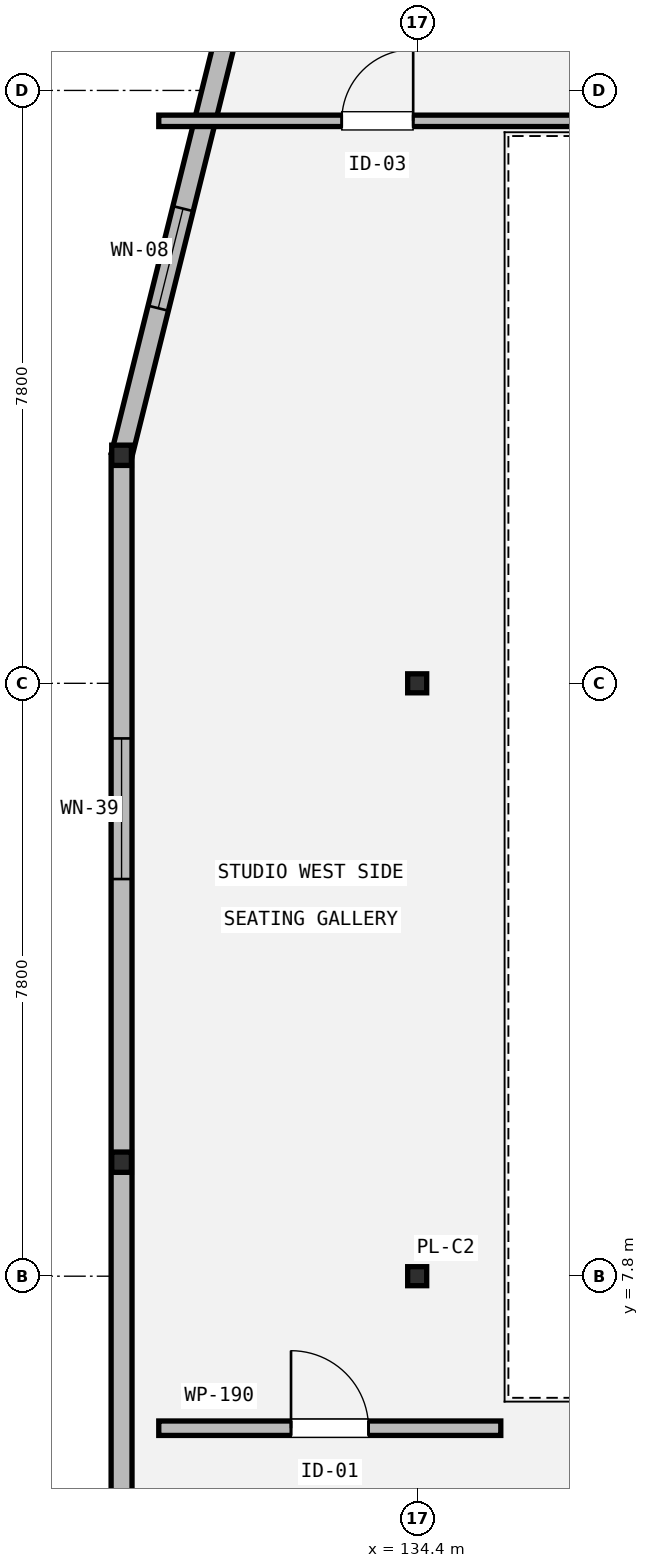
"""IFC4 building model, lengths in metres.
Left out: names, types, materials, properties, quantities, classifications, styles, units other than length and angle.
Written with IfcOpenShell. Run it as: python <this file> out.ifc"""

import sys

from ifc_helpers import new_model, si_unit, direction, frame, frame_2d, origin, origin_2d, place, context, subcontext, project, spatial, rectangle, hollow_rectangle, i_section, extrude, element, fill, save


model = new_model("IFC4")
c1 = context("Model", 3, precision=1e-05, world=origin(), true_north=direction((0.0, 1.0)))
c2 = subcontext(c1, "Body", "Model", "MODEL_VIEW")
j1 = project(units=[si_unit("LENGTHUNIT", "METRE"), si_unit("PLANEANGLEUNIT", "RADIAN")], contexts=[c1])
p1 = place(None, origin())
s1 = spatial("IfcSite", under=j1, at=p1, CompositionType="ELEMENT")
p2 = place(p1, origin())
s2 = spatial("IfcBuilding", under=s1, at=p2, CompositionType="ELEMENT")
p3 = place(p2, frame((0.0, 0.0, 5.4)))
s3 = spatial("IfcBuildingStorey", under=s2, at=p3, CompositionType="ELEMENT", Elevation=5.4)
for number, where, z_axis, x_axis in (
    (1, (130.51, 9.3, 0.0), (0.0, 0.0, 1.0), (1.0, 0.0, 0.0)),
    (2, (130.51, 18.6, 0.0), (0.0, 0.0, 1.0), (1.0, 0.0, 0.0)),
):
    element("IfcColumn", number, at=place(p3, frame(where, z_axis=z_axis, x_axis=x_axis)), inside=s3, PredefinedType="COLUMN", context=c2, shape_type="SweptSolid", body=[
        extrude(i_section(OverallWidth=0.259, OverallDepth=0.267, WebThickness=0.013, FlangeThickness=0.021, FilletRadius=0.013, at=origin_2d()), origin(), (0.0, 0.0, 1.0), 4.8),
    ])
for number, where, z_axis, x_axis in (
    (3, (134.4, 7.8, 0.0), (0.0, 0.0, 1.0), (1.0, 0.0, 0.0)),
    (4, (134.4, 15.6, 0.0), (0.0, 0.0, 1.0), (1.0, 0.0, 0.0)),
):
    element("IfcColumn", number, at=place(p3, frame(where, z_axis=z_axis, x_axis=x_axis)), inside=s3, PredefinedType="PILASTER", context=c2, shape_type="SweptSolid", body=[
        extrude(hollow_rectangle(XDim=0.25, YDim=0.25, WallThickness=0.012, at=origin_2d()), origin(), (0.0, 0.0, 1.0), 4.8),
    ])
p4 = place(p3, frame((130.51, 0.0, 0.0), z_axis=(0.0, 0.0, 1.0), x_axis=(0.0, 1.0, 0.0)))
e5 = element("IfcWall", 5, at=p4, inside=s3, PredefinedType="STANDARD", context=c2, shape_type="SweptSolid", body=[
    extrude(rectangle(XDim=18.6, YDim=0.275, at=frame_2d((9.3, 0.0))), origin(), (0.0, 0.0, 1.0), 3.889),
])
p5 = place(p4, frame((2.95, 0.0, 0.9)))
e6 = element("IfcOpeningElement", 6, at=p5, cuts=e5, PredefinedType="OPENING", context=c2, shape_type="SweptSolid", body=[
    extrude(rectangle(XDim=1.6, YDim=2.2, at=frame_2d((0.8, 1.1))), frame((0.0, 0.147, 0.0), z_axis=(0.0, -1.0, 0.0), x_axis=(1.0, 0.0, 0.0)), (0.0, 0.0, 1.0), 0.295),
])
p6 = place(p4, frame((13.025, 0.0, 0.9)))
e7 = element("IfcOpeningElement", 7, at=p6, cuts=e5, PredefinedType="OPENING", context=c2, shape_type="SweptSolid", body=[
    extrude(rectangle(XDim=1.85, YDim=2.2, at=frame_2d((0.925, 1.1))), frame((0.0, 0.147, 0.0), z_axis=(0.0, -1.0, 0.0), x_axis=(1.0, 0.0, 0.0)), (0.0, 0.0, 1.0), 0.295),
])
p7 = place(p3, frame((130.51, 18.6, 0.0), z_axis=(0.0, 0.0, 1.0), x_axis=(0.241917443673, 0.970296836255, 0.0)))
e8 = element("IfcWall", 8, at=p7, inside=s3, PredefinedType="STANDARD", context=c2, shape_type="SweptSolid", body=[
    extrude(rectangle(XDim=16.077, YDim=0.275, at=frame_2d((8.039, 0.0))), origin(), (0.0, 0.0, 1.0), 3.955),
])
p8 = place(p7, frame((1.994, 0.0, 0.9)))
e9 = element("IfcOpeningElement", 9, at=p8, cuts=e8, PredefinedType="OPENING", context=c2, shape_type="SweptSolid", body=[
    extrude(rectangle(XDim=1.35, YDim=1.8, at=frame_2d((0.675, 0.9))), frame((0.0, 0.147, 0.0), z_axis=(0.0, -1.0, 0.0), x_axis=(1.0, 0.0, 0.0)), (0.0, 0.0, 1.0), 0.295),
])
p9 = place(p7, frame((11.308, 0.0, 0.9)))
e10 = element("IfcOpeningElement", 10, at=p9, cuts=e8, PredefinedType="OPENING", context=c2, shape_type="SweptSolid", body=[
    extrude(rectangle(XDim=1.5, YDim=1.8, at=frame_2d((0.75, 0.9))), frame((0.0, 0.147, 0.0), z_axis=(0.0, -1.0, 0.0), x_axis=(1.0, 0.0, 0.0)), (0.0, 0.0, 1.0), 0.295),
])
p10 = place(p3, frame((131.0, 5.8, 0.0), z_axis=(0.0, 0.0, 1.0), x_axis=(1.0, 0.0, 0.0)))
e11 = element("IfcWall", 11, at=p10, inside=s3, PredefinedType="PARTITIONING", context=c2, shape_type="SweptSolid", body=[
    extrude(rectangle(XDim=4.5, YDim=0.19, at=frame_2d((2.25, 0.0))), origin(), (0.0, 0.0, 1.0), 4.552),
])
p11 = place(p10, frame((1.74, 0.0, 0.0)))
e12 = element("IfcOpeningElement", 12, at=p11, cuts=e11, PredefinedType="OPENING", context=c2, shape_type="SweptSolid", body=[
    extrude(rectangle(XDim=1.02, YDim=2.1, at=frame_2d((0.51, 1.05))), frame((0.0, 0.105, 0.0), z_axis=(0.0, -1.0, 0.0), x_axis=(1.0, 0.0, 0.0)), (0.0, 0.0, 1.0), 0.21),
])
p12 = place(p3, frame((131.0, 23.0, 0.0), z_axis=(0.0, 0.0, 1.0), x_axis=(1.0, 0.0, 0.0)))
e13 = element("IfcWall", 13, at=p12, inside=s3, PredefinedType="PARTITIONING", context=c2, shape_type="SweptSolid", body=[
    extrude(rectangle(XDim=21.0, YDim=0.15, at=frame_2d((10.5, 0.0))), origin(), (0.0, 0.0, 1.0), 3.955),
])
p13 = place(p12, frame((2.407, 0.0, 0.0)))
e14 = element("IfcOpeningElement", 14, at=p13, cuts=e13, PredefinedType="OPENING", context=c2, shape_type="SweptSolid", body=[
    extrude(rectangle(XDim=0.94, YDim=2.1, at=frame_2d((0.47, 1.05))), frame((0.0, 0.085, 0.0), z_axis=(0.0, -1.0, 0.0), x_axis=(1.0, 0.0, 0.0)), (0.0, 0.0, 1.0), 0.17),
])
p14 = place(p6, origin())
e15 = element("IfcWindow", 15, at=p14, inside=s3, PartitioningType="SINGLE_PANEL", PredefinedType="WINDOW", context=c2, shape_type="SweptSolid", body=[
    extrude(rectangle(XDim=1.85, YDim=2.2, at=frame_2d((0.925, 1.1))), frame((0.0, 0.03, 0.0), z_axis=(0.0, -1.0, 0.0), x_axis=(1.0, 0.0, 0.0)), (0.0, 0.0, 1.0), 0.06),
])
fill(e7, e15)
p15 = place(p8, origin())
e16 = element("IfcWindow", 16, at=p15, inside=s3, PartitioningType="SINGLE_PANEL", PredefinedType="WINDOW", context=c2, shape_type="SweptSolid", body=[
    extrude(rectangle(XDim=1.35, YDim=1.8, at=frame_2d((0.675, 0.9))), frame((0.0, 0.03, 0.0), z_axis=(0.0, -1.0, 0.0), x_axis=(1.0, 0.0, 0.0)), (0.0, 0.0, 1.0), 0.06),
])
fill(e9, e16)
p16 = place(p11, origin())
e17 = element("IfcDoor", 17, at=p16, inside=s3, OperationType="SINGLE_SWING_LEFT", PredefinedType="DOOR", context=c2, shape_type="SweptSolid", body=[
    extrude(rectangle(XDim=1.02, YDim=2.1, at=frame_2d((0.51, 1.05))), frame((0.0, 0.025, 0.0), z_axis=(0.0, -1.0, 0.0), x_axis=(1.0, 0.0, 0.0)), (0.0, 0.0, 1.0), 0.05),
])
fill(e12, e17)
p17 = place(p13, origin())
e18 = element("IfcDoor", 18, at=p17, inside=s3, OperationType="SINGLE_SWING_RIGHT", PredefinedType="DOOR", context=c2, shape_type="SweptSolid", body=[
    extrude(rectangle(XDim=0.94, YDim=2.1, at=frame_2d((0.47, 1.05))), frame((0.0, 0.025, 0.0), z_axis=(0.0, -1.0, 0.0), x_axis=(1.0, 0.0, 0.0)), (0.0, 0.0, 1.0), 0.05),
])
fill(e14, e18)
save(model, sys.argv[1])
